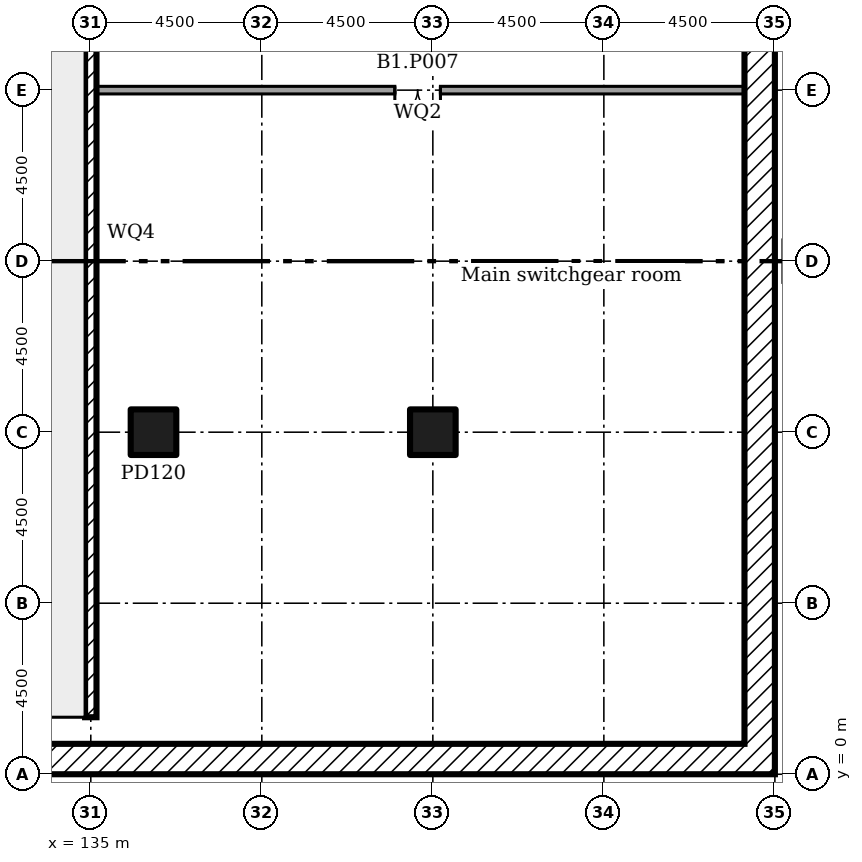
"""IFC4 building model, lengths in metres.
Left out: names, types, materials, properties, quantities, classifications, styles, units other than length and angle.
Written with IfcOpenShell. Run it as: python <this file> out.ifc"""

import sys

from ifc_helpers import new_model, si_unit, direction, frame, frame_2d, origin, origin_2d, place, context, subcontext, project, spatial, rectangle, extrude, element, fill, save


model = new_model("IFC4")
c1 = context("Model", 3, precision=1e-05, world=origin(), true_north=direction((0.0, 1.0)))
c2 = subcontext(c1, "Body", "Model", "MODEL_VIEW")
j1 = project(units=[si_unit("LENGTHUNIT", "METRE"), si_unit("PLANEANGLEUNIT", "RADIAN")], contexts=[c1])
p1 = place(None, origin())
s1 = spatial("IfcSite", under=j1, at=p1, CompositionType="ELEMENT")
p2 = place(p1, origin())
s2 = spatial("IfcBuilding", under=s1, at=p2, CompositionType="ELEMENT")
p3 = place(p2, frame((0.0, 0.0, -4.0)))
s3 = spatial("IfcBuildingStorey", under=s2, at=p3, CompositionType="ELEMENT", Elevation=-4.0)
for number, where in (
    (1, (136.65, 9.0, 0.0)),
    (2, (144.0, 9.0, 0.0)),
):
    element("IfcColumn", number, at=place(p3, frame(where)), inside=s3, PredefinedType="COLUMN", context=c2, shape_type="SweptSolid", body=[
        extrude(rectangle(XDim=1.2, YDim=1.2, at=origin_2d()), origin(), (0.0, 0.0, 1.0), 4.0),
    ])
p4 = place(p3, frame((0.0, 0.4, 0.0)))
e3 = element("IfcWall", 3, at=p4, inside=s3, PredefinedType="SOLIDWALL", context=c2, shape_type="SweptSolid", body=[
    extrude(rectangle(XDim=153.0, YDim=0.8, at=frame_2d((76.5, 0.0))), origin(), (0.0, 0.0, 1.0), 4.0),
])
p5 = place(p3, frame((152.6, 0.8, 0.0), z_axis=(0.0, 0.0, 1.0), x_axis=(0.0, 1.0, 0.0)))
e4 = element("IfcWall", 4, at=p5, inside=s3, PredefinedType="SOLIDWALL", context=c2, shape_type="SweptSolid", body=[
    extrude(rectangle(XDim=97.4, YDim=0.8, at=frame_2d((48.7, 0.0))), origin(), (0.0, 0.0, 1.0), 4.0),
])
p6 = place(p3, frame((135.0, 18.0, 0.0)))
e5 = element("IfcWall", 5, at=p6, inside=s3, PredefinedType="SOLIDWALL", context=c2, shape_type="SweptSolid", body=[
    extrude(rectangle(XDim=17.2, YDim=0.2, at=frame_2d((8.6, 0.0))), origin(), (0.0, 0.0, 1.0), 3.55),
])
p7 = place(p6, frame((8.0, 0.0, 0.0)))
e6 = element("IfcOpeningElement", 6, at=p7, cuts=e5, PredefinedType="OPENING", context=c2, shape_type="SweptSolid", body=[
    extrude(rectangle(XDim=1.2, YDim=2.1, at=frame_2d((0.6, 1.05))), frame((0.0, 0.11, 0.0), z_axis=(0.0, -1.0, 0.0), x_axis=(1.0, 0.0, 0.0)), (0.0, 0.0, 1.0), 0.22),
])
p8 = place(p3, frame((135.0, 1.5, 0.0), z_axis=(0.0, 0.0, 1.0), x_axis=(0.0, 1.0, 0.0)))
e7 = element("IfcWall", 7, at=p8, inside=s3, PredefinedType="SOLIDWALL", context=c2, shape_type="SweptSolid", body=[
    extrude(rectangle(XDim=25.5, YDim=0.3, at=frame_2d((12.75, 0.0))), origin(), (0.0, 0.0, 1.0), 4.0),
])
p9 = place(p7, frame((1.2, 0.0, 0.0), x_axis=(-1.0, 0.0, 0.0)))
e8 = element("IfcDoor", 8, at=p9, inside=s3, OperationType="DOUBLE_DOOR_SINGLE_SWING", PredefinedType="DOOR", context=c2, shape_type="SweptSolid", body=[
    extrude(rectangle(XDim=1.2, YDim=2.1, at=frame_2d((0.6, 1.05))), frame((0.0, 0.025, 0.0), z_axis=(0.0, -1.0, 0.0), x_axis=(1.0, 0.0, 0.0)), (0.0, 0.0, 1.0), 0.05),
])
fill(e6, e8)
save(model, sys.argv[1])
